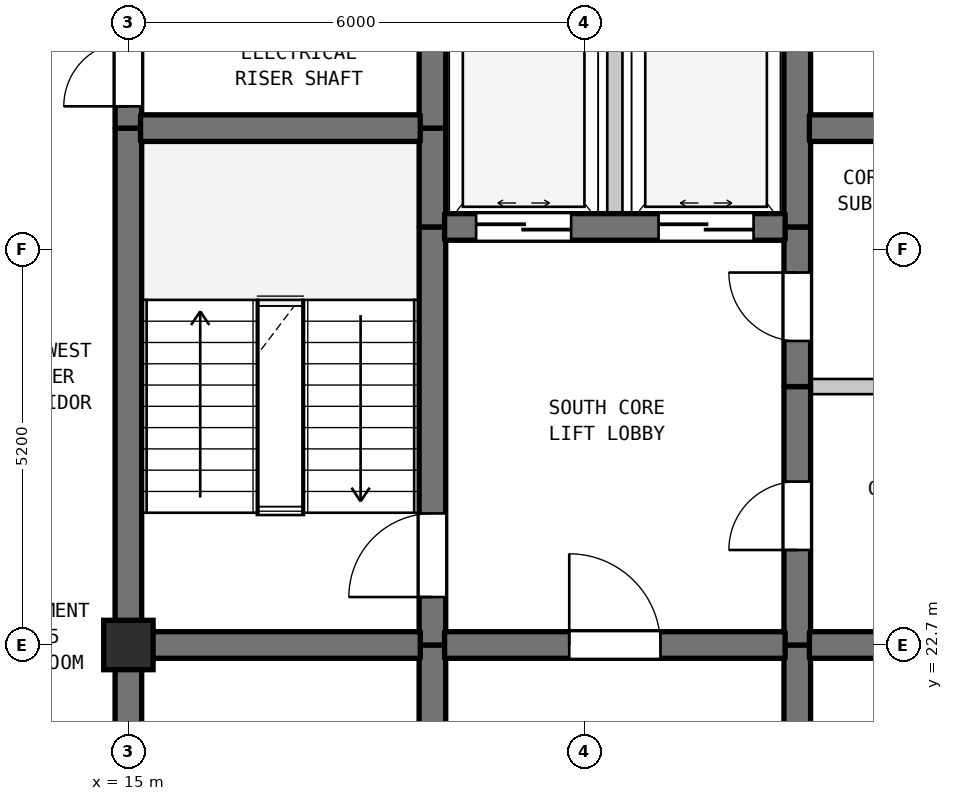
"""IFC4 building model, lengths in metres.
Left out: names, types, materials, properties, quantities, classifications, styles, units other than length and angle.
Written with IfcOpenShell. Run it as: python <this file> out.ifc"""

import sys

from ifc_helpers import new_model, si_unit, direction, frame, frame_2d, origin, origin_2d, place, context, subcontext, project, spatial, rectangle, extrude, element, fill, save


model = new_model("IFC4")
c1 = context("Model", 3, precision=1e-05, world=origin(), true_north=direction((0.0, 1.0)))
c2 = subcontext(c1, "Body", "Model", "MODEL_VIEW")
j1 = project(units=[si_unit("LENGTHUNIT", "METRE"), si_unit("PLANEANGLEUNIT", "RADIAN")], contexts=[c1])
p1 = place(None, origin())
s1 = spatial("IfcSite", under=j1, at=p1, CompositionType="ELEMENT")
p2 = place(p1, origin())
s2 = spatial("IfcBuilding", under=s1, at=p2, CompositionType="ELEMENT")
p3 = place(p2, frame((0.0, 0.0, 311.0)))
s3 = spatial("IfcBuildingStorey", under=s2, at=p3, CompositionType="ELEMENT", Elevation=311.0)
p4 = place(p3, frame((15.0, 22.7, 0.0), z_axis=(0.0, 0.0, 1.0), x_axis=(1.0, 0.0, 0.0)))
e1 = element("IfcColumn", 1, at=p4, inside=s3, PredefinedType="COLUMN", context=c2, shape_type="SweptSolid", body=[
    extrude(rectangle(XDim=0.65, YDim=0.65, at=origin_2d()), origin(), (0.0, 0.0, 1.0), 3.7),
])
p5 = place(p3, frame((15.0, 19.5, 0.0), z_axis=(0.0, 0.0, 1.0), x_axis=(0.0, 1.0, 0.0)))
e2 = element("IfcWall", 2, at=p5, inside=s3, PredefinedType="SHEAR", context=c2, shape_type="SweptSolid", body=[
    extrude(rectangle(XDim=3.2, YDim=0.35, at=frame_2d((1.6, 0.0))), origin(), (0.0, 0.0, 1.0), 3.28),
])
p6 = place(p3, frame((15.0, 22.7, 0.0), z_axis=(0.0, 0.0, 1.0), x_axis=(0.0, 1.0, 0.0)))
e3 = element("IfcWall", 3, at=p6, inside=s3, PredefinedType="SHEAR", context=c2, shape_type="SweptSolid", body=[
    extrude(rectangle(XDim=6.8, YDim=0.35, at=frame_2d((3.4, 0.0))), origin(), (0.0, 0.0, 1.0), 3.28),
])
p7 = place(p3, frame((15.0, 29.5, 0.0), z_axis=(0.0, 0.0, 1.0), x_axis=(0.0, 1.0, 0.0)))
e4 = element("IfcWall", 4, at=p7, inside=s3, PredefinedType="SHEAR", context=c2, shape_type="SweptSolid", body=[
    extrude(rectangle(XDim=1.6, YDim=0.35, at=frame_2d((0.8, 0.0))), origin(), (0.0, 0.0, 1.0), 3.28),
])
p8 = place(p7, frame((0.287, 0.0, 0.0)))
e5 = element("IfcOpeningElement", 5, at=p8, cuts=e4, PredefinedType="OPENING", context=c2, shape_type="SweptSolid", body=[
    extrude(rectangle(XDim=0.85, YDim=2.1, at=frame_2d((0.425, 1.05))), frame((0.0, 0.185, 0.0), z_axis=(0.0, -1.0, 0.0), x_axis=(1.0, 0.0, 0.0)), (0.0, 0.0, 1.0), 0.37),
])
p9 = place(p3, frame((19.0, 19.5, 0.0), z_axis=(0.0, 0.0, 1.0), x_axis=(0.0, 1.0, 0.0)))
e6 = element("IfcWall", 6, at=p9, inside=s3, PredefinedType="SHEAR", context=c2, shape_type="SweptSolid", body=[
    extrude(rectangle(XDim=3.2, YDim=0.35, at=frame_2d((1.6, 0.0))), origin(), (0.0, 0.0, 1.0), 3.28),
])
p10 = place(p3, frame((19.0, 22.7, 0.0), z_axis=(0.0, 0.0, 1.0), x_axis=(0.0, 1.0, 0.0)))
e7 = element("IfcWall", 7, at=p10, inside=s3, PredefinedType="SHEAR", context=c2, shape_type="SweptSolid", body=[
    extrude(rectangle(XDim=5.5, YDim=0.35, at=frame_2d((2.75, 0.0))), origin(), (0.0, 0.0, 1.0), 3.28),
])
p11 = place(p10, frame((0.631, 0.0, 0.0)))
e8 = element("IfcOpeningElement", 8, at=p11, cuts=e7, PredefinedType="OPENING", context=c2, shape_type="SweptSolid", body=[
    extrude(rectangle(XDim=1.1, YDim=2.15, at=frame_2d((0.55, 1.075))), frame((0.0, 0.185, 0.0), z_axis=(0.0, -1.0, 0.0), x_axis=(1.0, 0.0, 0.0)), (0.0, 0.0, 1.0), 0.37),
])
p12 = place(p3, frame((19.0, 28.2, 0.0), z_axis=(0.0, 0.0, 1.0), x_axis=(0.0, 1.0, 0.0)))
e9 = element("IfcWall", 9, at=p12, inside=s3, PredefinedType="SHEAR", context=c2, shape_type="SweptSolid", body=[
    extrude(rectangle(XDim=1.3, YDim=0.35, at=frame_2d((0.65, 0.0))), origin(), (0.0, 0.0, 1.0), 3.28),
])
p13 = place(p3, frame((19.0, 29.5, 0.0), z_axis=(0.0, 0.0, 1.0), x_axis=(0.0, 1.0, 0.0)))
e10 = element("IfcWall", 10, at=p13, inside=s3, PredefinedType="SHEAR", context=c2, shape_type="SweptSolid", body=[
    extrude(rectangle(XDim=5.5, YDim=0.35, at=frame_2d((2.75, 0.0))), origin(), (0.0, 0.0, 1.0), 3.28),
])
p14 = place(p13, frame((2.025, 0.0, 0.0)))
e11 = element("IfcOpeningElement", 11, at=p14, cuts=e10, PredefinedType="OPENING", context=c2, shape_type="SweptSolid", body=[
    extrude(rectangle(XDim=1.1, YDim=2.15, at=frame_2d((0.55, 1.075))), frame((0.0, 0.185, 0.0), z_axis=(0.0, -1.0, 0.0), x_axis=(1.0, 0.0, 0.0)), (0.0, 0.0, 1.0), 0.37),
])
p15 = place(p3, frame((21.4, 28.2, 0.0), z_axis=(0.0, 0.0, 1.0), x_axis=(0.0, 1.0, 0.0)))
e12 = element("IfcWall", 12, at=p15, inside=s3, PredefinedType="STANDARD", context=c2, shape_type="SweptSolid", body=[
    extrude(rectangle(XDim=2.6, YDim=0.2, at=frame_2d((1.3, 0.0))), origin(), (0.0, 0.0, 1.0), 3.28),
])
p16 = place(p3, frame((23.8, 19.5, 0.0), z_axis=(0.0, 0.0, 1.0), x_axis=(0.0, 1.0, 0.0)))
e13 = element("IfcWall", 13, at=p16, inside=s3, PredefinedType="SHEAR", context=c2, shape_type="SweptSolid", body=[
    extrude(rectangle(XDim=3.2, YDim=0.35, at=frame_2d((1.6, 0.0))), origin(), (0.0, 0.0, 1.0), 3.28),
])
p17 = place(p3, frame((23.8, 22.7, 0.0), z_axis=(0.0, 0.0, 1.0), x_axis=(0.0, 1.0, 0.0)))
e14 = element("IfcWall", 14, at=p17, inside=s3, PredefinedType="SHEAR", context=c2, shape_type="SweptSolid", body=[
    extrude(rectangle(XDim=3.4, YDim=0.35, at=frame_2d((1.7, 0.0))), origin(), (0.0, 0.0, 1.0), 3.28),
])
p18 = place(p17, frame((1.25, 0.0, 0.0)))
e15 = element("IfcOpeningElement", 15, at=p18, cuts=e14, PredefinedType="OPENING", context=c2, shape_type="SweptSolid", body=[
    extrude(rectangle(XDim=0.9, YDim=2.15, at=frame_2d((0.45, 1.075))), frame((0.0, 0.185, 0.0), z_axis=(0.0, -1.0, 0.0), x_axis=(1.0, 0.0, 0.0)), (0.0, 0.0, 1.0), 0.37),
])
p19 = place(p3, frame((23.8, 26.1, 0.0), z_axis=(0.0, 0.0, 1.0), x_axis=(0.0, 1.0, 0.0)))
e16 = element("IfcWall", 16, at=p19, inside=s3, PredefinedType="SHEAR", context=c2, shape_type="SweptSolid", body=[
    extrude(rectangle(XDim=2.1, YDim=0.35, at=frame_2d((1.05, 0.0))), origin(), (0.0, 0.0, 1.0), 3.28),
])
p20 = place(p19, frame((0.6, 0.0, 0.0)))
e17 = element("IfcOpeningElement", 17, at=p20, cuts=e16, PredefinedType="OPENING", context=c2, shape_type="SweptSolid", body=[
    extrude(rectangle(XDim=0.9, YDim=2.15, at=frame_2d((0.45, 1.075))), frame((0.0, 0.185, 0.0), z_axis=(0.0, -1.0, 0.0), x_axis=(1.0, 0.0, 0.0)), (0.0, 0.0, 1.0), 0.37),
])
p21 = place(p3, frame((23.8, 28.2, 0.0), z_axis=(0.0, 0.0, 1.0), x_axis=(0.0, 1.0, 0.0)))
e18 = element("IfcWall", 18, at=p21, inside=s3, PredefinedType="SHEAR", context=c2, shape_type="SweptSolid", body=[
    extrude(rectangle(XDim=2.6, YDim=0.35, at=frame_2d((1.3, 0.0))), origin(), (0.0, 0.0, 1.0), 3.28),
])
p22 = place(p3, frame((15.16, 22.7, 0.0), z_axis=(0.0, 0.0, 1.0), x_axis=(1.0, 0.0, 0.0)))
e19 = element("IfcWall", 19, at=p22, inside=s3, PredefinedType="SHEAR", context=c2, shape_type="SweptSolid", body=[
    extrude(rectangle(XDim=3.68, YDim=0.35, at=frame_2d((1.84, 0.0))), origin(), (0.0, 0.0, 1.0), 3.28),
])
p23 = place(p3, frame((19.16, 22.7, 0.0), z_axis=(0.0, 0.0, 1.0), x_axis=(1.0, 0.0, 0.0)))
e20 = element("IfcWall", 20, at=p23, inside=s3, PredefinedType="SHEAR", context=c2, shape_type="SweptSolid", body=[
    extrude(rectangle(XDim=4.48, YDim=0.35, at=frame_2d((2.24, 0.0))), origin(), (0.0, 0.0, 1.0), 3.28),
])
p24 = place(p23, frame((1.64, 0.0, 0.0)))
e21 = element("IfcOpeningElement", 21, at=p24, cuts=e20, PredefinedType="OPENING", context=c2, shape_type="SweptSolid", body=[
    extrude(rectangle(XDim=1.2, YDim=2.2, at=frame_2d((0.6, 1.1))), frame((0.0, 0.185, 0.0), z_axis=(0.0, -1.0, 0.0), x_axis=(1.0, 0.0, 0.0)), (0.0, 0.0, 1.0), 0.37),
])
p25 = place(p3, frame((23.96, 22.7, 0.0), z_axis=(0.0, 0.0, 1.0), x_axis=(1.0, 0.0, 0.0)))
e22 = element("IfcWall", 22, at=p25, inside=s3, PredefinedType="SHEAR", context=c2, shape_type="SweptSolid", body=[
    extrude(rectangle(XDim=3.155, YDim=0.35, at=frame_2d((1.578, 0.0))), origin(), (0.0, 0.0, 1.0), 3.28),
])
p26 = place(p3, frame((23.96, 26.1, 0.0), z_axis=(0.0, 0.0, 1.0), x_axis=(1.0, 0.0, 0.0)))
e23 = element("IfcWall", 23, at=p26, inside=s3, PredefinedType="STANDARD", context=c2, shape_type="SweptSolid", body=[
    extrude(rectangle(XDim=3.18, YDim=0.2, at=frame_2d((1.59, 0.0))), origin(), (0.0, 0.0, 1.0), 3.28),
])
p27 = place(p3, frame((19.16, 28.2, 0.0), z_axis=(0.0, 0.0, 1.0), x_axis=(1.0, 0.0, 0.0)))
e24 = element("IfcWall", 24, at=p27, inside=s3, PredefinedType="SHEAR", context=c2, shape_type="SweptSolid", body=[
    extrude(rectangle(XDim=4.48, YDim=0.35, at=frame_2d((2.24, 0.0))), origin(), (0.0, 0.0, 1.0), 3.28),
])
p28 = place(p27, frame((0.415, 0.0, 0.0)))
e25 = element("IfcOpeningElement", 25, at=p28, cuts=e24, PredefinedType="OPENING", context=c2, shape_type="SweptSolid", body=[
    extrude(rectangle(XDim=1.25, YDim=2.2, at=frame_2d((0.625, 1.1))), frame((0.0, 0.185, 0.0), z_axis=(0.0, -1.0, 0.0), x_axis=(1.0, 0.0, 0.0)), (0.0, 0.0, 1.0), 0.37),
])
p29 = place(p27, frame((2.815, 0.0, 0.0)))
e26 = element("IfcOpeningElement", 26, at=p29, cuts=e24, PredefinedType="OPENING", context=c2, shape_type="SweptSolid", body=[
    extrude(rectangle(XDim=1.25, YDim=2.2, at=frame_2d((0.625, 1.1))), frame((0.0, 0.185, 0.0), z_axis=(0.0, -1.0, 0.0), x_axis=(1.0, 0.0, 0.0)), (0.0, 0.0, 1.0), 0.37),
])
p30 = place(p3, frame((15.16, 29.5, 0.0), z_axis=(0.0, 0.0, 1.0), x_axis=(1.0, 0.0, 0.0)))
e27 = element("IfcWall", 27, at=p30, inside=s3, PredefinedType="SHEAR", context=c2, shape_type="SweptSolid", body=[
    extrude(rectangle(XDim=3.68, YDim=0.35, at=frame_2d((1.84, 0.0))), origin(), (0.0, 0.0, 1.0), 3.28),
])
p31 = place(p3, frame((23.96, 29.5, 0.0), z_axis=(0.0, 0.0, 1.0), x_axis=(1.0, 0.0, 0.0)))
e28 = element("IfcWall", 28, at=p31, inside=s3, PredefinedType="SHEAR", context=c2, shape_type="SweptSolid", body=[
    extrude(rectangle(XDim=3.18, YDim=0.35, at=frame_2d((1.59, 0.0))), origin(), (0.0, 0.0, 1.0), 3.28),
])
p32 = place(p8, origin())
e29 = element("IfcDoor", 29, at=p32, inside=s3, OperationType="SINGLE_SWING_LEFT", PredefinedType="DOOR", context=c2, shape_type="SweptSolid", body=[
    extrude(rectangle(XDim=0.85, YDim=2.1, at=frame_2d((0.425, 1.05))), frame((0.0, 0.025, 0.0), z_axis=(0.0, -1.0, 0.0), x_axis=(1.0, 0.0, 0.0)), (0.0, 0.0, 1.0), 0.05),
])
fill(e5, e29)
p33 = place(p11, origin())
e30 = element("IfcDoor", 30, at=p33, inside=s3, OperationType="SINGLE_SWING_LEFT", PredefinedType="DOOR", context=c2, shape_type="SweptSolid", body=[
    extrude(rectangle(XDim=1.1, YDim=2.15, at=frame_2d((0.55, 1.075))), frame((0.0, 0.025, 0.0), z_axis=(0.0, -1.0, 0.0), x_axis=(1.0, 0.0, 0.0)), (0.0, 0.0, 1.0), 0.05),
])
fill(e8, e30)
p34 = place(p18, origin())
e31 = element("IfcDoor", 31, at=p34, inside=s3, OperationType="SINGLE_SWING_LEFT", PredefinedType="DOOR", context=c2, shape_type="SweptSolid", body=[
    extrude(rectangle(XDim=0.9, YDim=2.15, at=frame_2d((0.45, 1.075))), frame((0.0, 0.025, 0.0), z_axis=(0.0, -1.0, 0.0), x_axis=(1.0, 0.0, 0.0)), (0.0, 0.0, 1.0), 0.05),
])
fill(e15, e31)
p35 = place(p20, origin())
e32 = element("IfcDoor", 32, at=p35, inside=s3, OperationType="SINGLE_SWING_RIGHT", PredefinedType="DOOR", context=c2, shape_type="SweptSolid", body=[
    extrude(rectangle(XDim=0.9, YDim=2.15, at=frame_2d((0.45, 1.075))), frame((0.0, 0.025, 0.0), z_axis=(0.0, -1.0, 0.0), x_axis=(1.0, 0.0, 0.0)), (0.0, 0.0, 1.0), 0.05),
])
fill(e17, e32)
p36 = place(p24, origin())
e33 = element("IfcDoor", 33, at=p36, inside=s3, OperationType="SINGLE_SWING_LEFT", PredefinedType="DOOR", context=c2, shape_type="SweptSolid", body=[
    extrude(rectangle(XDim=1.2, YDim=2.2, at=frame_2d((0.6, 1.1))), frame((0.0, 0.025, 0.0), z_axis=(0.0, -1.0, 0.0), x_axis=(1.0, 0.0, 0.0)), (0.0, 0.0, 1.0), 0.05),
])
fill(e21, e33)
p37 = place(p28, origin())
e34 = element("IfcDoor", 34, at=p37, inside=s3, OperationType="DOUBLE_DOOR_SLIDING", PredefinedType="DOOR", context=c2, shape_type="SweptSolid", body=[
    extrude(rectangle(XDim=1.25, YDim=2.2, at=frame_2d((0.625, 1.1))), frame((0.0, 0.025, 0.0), z_axis=(0.0, -1.0, 0.0), x_axis=(1.0, 0.0, 0.0)), (0.0, 0.0, 1.0), 0.05),
])
fill(e25, e34)
p38 = place(p29, origin())
e35 = element("IfcDoor", 35, at=p38, inside=s3, OperationType="DOUBLE_DOOR_SLIDING", PredefinedType="DOOR", context=c2, shape_type="SweptSolid", body=[
    extrude(rectangle(XDim=1.25, YDim=2.2, at=frame_2d((0.625, 1.1))), frame((0.0, 0.025, 0.0), z_axis=(0.0, -1.0, 0.0), x_axis=(1.0, 0.0, 0.0)), (0.0, 0.0, 1.0), 0.05),
])
fill(e26, e35)
save(model, sys.argv[1])
